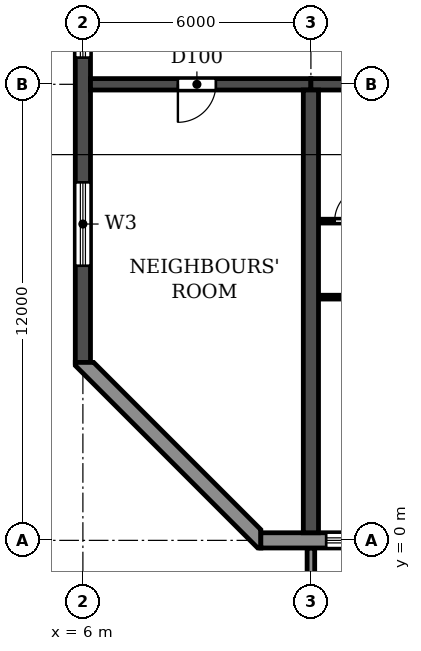
"""IFC4 building model, lengths in metres.
Left out: names, types, materials, properties, quantities, classifications, styles, units other than length and angle.
Written with IfcOpenShell. Run it as: python <this file> out.ifc"""

import sys

from ifc_helpers import new_model, si_unit, direction, frame, frame_2d, origin, place, context, subcontext, project, spatial, polyline, rectangle, outline, extrude, source, transform, mapped, element, fill, save


model = new_model("IFC4")
c1 = context("Model", 3, precision=1e-05, world=origin(), true_north=direction((0.0, 1.0)))
c2 = subcontext(c1, "Body", "Model", "MODEL_VIEW")
j1 = project(units=[si_unit("LENGTHUNIT", "METRE"), si_unit("PLANEANGLEUNIT", "RADIAN")], contexts=[c1])
p1 = place(None, origin())
s1 = spatial("IfcSite", under=j1, at=p1, CompositionType="ELEMENT")
p2 = place(p1, origin())
s2 = spatial("IfcBuilding", under=s1, at=p2, CompositionType="ELEMENT")
p3 = place(p2, frame((0.0, 0.0, 63.0)))
s3 = spatial("IfcBuildingStorey", under=s2, at=p3, CompositionType="ELEMENT", Elevation=63.0)
p4 = place(p3, frame((12.0, 0.2, 0.0), z_axis=(0.0, 0.0, 1.0), x_axis=(0.0, 1.0, 0.0)))
e1 = element("IfcWall", 1, at=p4, inside=s3, PredefinedType="SHEAR", context=c2, shape_type="SweptSolid", body=[
    extrude(rectangle(XDim=11.65, YDim=0.4, at=frame_2d((5.825, 0.0))), origin(), (0.0, 0.0, 1.0), 2.95),
])
p5 = place(p3, frame((6.0, 4.683, 0.0), z_axis=(0.0, 0.0, 1.0), x_axis=(0.0, 1.0, 0.0)))
e2 = element("IfcWall", 2, at=p5, inside=s3, PredefinedType="SHEAR", context=c2, shape_type="SweptSolid", body=[
    extrude(rectangle(XDim=35.434, YDim=0.4, at=frame_2d((17.717, 0.0))), origin(), (0.0, 0.0, 1.0), 2.95),
])
p6 = place(p5, frame((23.817, 0.0, 0.9)))
e3 = element("IfcOpeningElement", 3, at=p6, cuts=e2, PredefinedType="OPENING", context=c2, shape_type="SweptSolid", body=[
    extrude(rectangle(XDim=1.2, YDim=1.5, at=frame_2d((0.6, 0.75))), frame((0.0, 0.21, 0.0), z_axis=(0.0, -1.0, 0.0), x_axis=(1.0, 0.0, 0.0)), (0.0, 0.0, 1.0), 0.42),
])
p7 = place(p5, frame((8.017, 0.0, 0.9)))
e4 = element("IfcOpeningElement", 4, at=p7, cuts=e2, PredefinedType="OPENING", context=c2, shape_type="SweptSolid", body=[
    extrude(rectangle(XDim=1.2, YDim=1.5, at=frame_2d((0.6, 0.75))), frame((0.0, 0.21, 0.0), z_axis=(0.0, -1.0, 0.0), x_axis=(1.0, 0.0, 0.0)), (0.0, 0.0, 1.0), 0.42),
])
p8 = place(p5, frame((15.917, 0.0, 0.9)))
e5 = element("IfcOpeningElement", 5, at=p8, cuts=e2, PredefinedType="OPENING", context=c2, shape_type="SweptSolid", body=[
    extrude(rectangle(XDim=1.2, YDim=1.5, at=frame_2d((0.6, 0.75))), frame((0.0, 0.21, 0.0), z_axis=(0.0, -1.0, 0.0), x_axis=(1.0, 0.0, 0.0)), (0.0, 0.0, 1.0), 0.42),
])
p9 = place(p5, frame((29.493, 0.0, 0.6)))
e6 = element("IfcOpeningElement", 6, at=p9, cuts=e2, PredefinedType="OPENING", context=c2, shape_type="SweptSolid", body=[
    extrude(rectangle(XDim=2.2, YDim=1.8, at=frame_2d((1.1, 0.9))), frame((0.0, 0.21, 0.0), z_axis=(0.0, -1.0, 0.0), x_axis=(1.0, 0.0, 0.0)), (0.0, 0.0, 1.0), 0.42),
])
p10 = place(p5, frame((2.541, 0.0, 0.6)))
e7 = element("IfcOpeningElement", 7, at=p10, cuts=e2, PredefinedType="OPENING", context=c2, shape_type="SweptSolid", body=[
    extrude(rectangle(XDim=2.2, YDim=1.8, at=frame_2d((1.1, 0.9))), frame((0.0, 0.21, 0.0), z_axis=(0.0, -1.0, 0.0), x_axis=(1.0, 0.0, 0.0)), (0.0, 0.0, 1.0), 0.42),
])
p11 = place(p3, frame((6.2, 12.0, 0.0), z_axis=(0.0, 0.0, 1.0), x_axis=(1.0, 0.0, 0.0)))
e8 = element("IfcWall", 8, at=p11, inside=s3, PredefinedType="SHEAR", context=c2, shape_type="SweptSolid", body=[
    extrude(rectangle(XDim=5.8, YDim=0.3, at=frame_2d((2.9, 0.0))), origin(), (0.0, 0.0, 1.0), 2.35),
])
p12 = place(p11, frame((2.3, 0.0, 0.0)))
e9 = element("IfcOpeningElement", 9, at=p12, cuts=e8, PredefinedType="OPENING", context=c2, shape_type="SweptSolid", body=[
    extrude(rectangle(XDim=1.0, YDim=2.1, at=frame_2d((0.5, 1.05))), frame((0.0, 0.16, 0.0), z_axis=(0.0, -1.0, 0.0), x_axis=(1.0, 0.0, 0.0)), (0.0, 0.0, 1.0), 0.32),
])
p13 = place(p3, frame((12.0, 12.0, 0.0), z_axis=(0.0, 0.0, 1.0), x_axis=(1.0, 0.0, 0.0)))
e10 = element("IfcWall", 10, at=p13, inside=s3, PredefinedType="SHEAR", context=c2, shape_type="SweptSolid", body=[
    extrude(rectangle(XDim=6.0, YDim=0.3, at=frame_2d((3.0, 0.0))), origin(), (0.0, 0.0, 1.0), 2.35),
])
p14 = place(p13, frame((2.55, 0.0, 0.0)))
e11 = element("IfcOpeningElement", 11, at=p14, cuts=e10, PredefinedType="OPENING", context=c2, shape_type="SweptSolid", body=[
    extrude(rectangle(XDim=1.0, YDim=2.1, at=frame_2d((0.5, 1.05))), frame((0.0, 0.16, 0.0), z_axis=(0.0, -1.0, 0.0), x_axis=(1.0, 0.0, 0.0)), (0.0, 0.0, 1.0), 0.32),
])
p15 = place(p3, frame((10.683, 0.0, 0.0), z_axis=(0.0, 0.0, 1.0), x_axis=(1.0, 0.0, 0.0)))
e12 = element("IfcWall", 12, at=p15, inside=s3, PredefinedType="STANDARD", context=c2, shape_type="SweptSolid", body=[
    extrude(rectangle(XDim=80.634, YDim=0.4, at=frame_2d((40.317, 0.0))), origin(), (0.0, 0.0, 1.0), 2.95),
])
p16 = place(p15, frame((1.717, 0.0, 0.9)))
e13 = element("IfcOpeningElement", 13, at=p16, cuts=e12, PredefinedType="OPENING", context=c2, shape_type="SweptSolid", body=[
    extrude(rectangle(XDim=2.2, YDim=1.5, at=frame_2d((1.1, 0.75))), frame((0.0, 0.21, 0.0), z_axis=(0.0, -1.0, 0.0), x_axis=(1.0, 0.0, 0.0)), (0.0, 0.0, 1.0), 0.42),
])
p17 = place(p15, frame((4.917, 0.0, 0.0)))
e14 = element("IfcOpeningElement", 14, at=p17, cuts=e12, PredefinedType="OPENING", context=c2, shape_type="SweptSolid", body=[
    extrude(rectangle(XDim=1.8, YDim=2.4, at=frame_2d((0.9, 1.2))), frame((0.0, 0.21, 0.0), z_axis=(0.0, -1.0, 0.0), x_axis=(1.0, 0.0, 0.0)), (0.0, 0.0, 1.0), 0.42),
])
p18 = place(p15, frame((7.717, 0.0, 0.9)))
e15 = element("IfcOpeningElement", 15, at=p18, cuts=e12, PredefinedType="OPENING", context=c2, shape_type="SweptSolid", body=[
    extrude(rectangle(XDim=2.2, YDim=1.5, at=frame_2d((1.1, 0.75))), frame((0.0, 0.21, 0.0), z_axis=(0.0, -1.0, 0.0), x_axis=(1.0, 0.0, 0.0)), (0.0, 0.0, 1.0), 0.42),
])
p19 = place(p15, frame((10.717, 0.0, 0.9)))
e16 = element("IfcOpeningElement", 16, at=p19, cuts=e12, PredefinedType="OPENING", context=c2, shape_type="SweptSolid", body=[
    extrude(rectangle(XDim=2.2, YDim=1.5, at=frame_2d((1.1, 0.75))), frame((0.0, 0.21, 0.0), z_axis=(0.0, -1.0, 0.0), x_axis=(1.0, 0.0, 0.0)), (0.0, 0.0, 1.0), 0.42),
])
p20 = place(p15, frame((13.717, 0.0, 0.9)))
e17 = element("IfcOpeningElement", 17, at=p20, cuts=e12, PredefinedType="OPENING", context=c2, shape_type="SweptSolid", body=[
    extrude(rectangle(XDim=2.2, YDim=1.5, at=frame_2d((1.1, 0.75))), frame((0.0, 0.21, 0.0), z_axis=(0.0, -1.0, 0.0), x_axis=(1.0, 0.0, 0.0)), (0.0, 0.0, 1.0), 0.42),
])
p21 = place(p15, frame((16.917, 0.0, 0.0)))
e18 = element("IfcOpeningElement", 18, at=p21, cuts=e12, PredefinedType="OPENING", context=c2, shape_type="SweptSolid", body=[
    extrude(rectangle(XDim=1.8, YDim=2.4, at=frame_2d((0.9, 1.2))), frame((0.0, 0.21, 0.0), z_axis=(0.0, -1.0, 0.0), x_axis=(1.0, 0.0, 0.0)), (0.0, 0.0, 1.0), 0.42),
])
p22 = place(p15, frame((19.717, 0.0, 0.9)))
e19 = element("IfcOpeningElement", 19, at=p22, cuts=e12, PredefinedType="OPENING", context=c2, shape_type="SweptSolid", body=[
    extrude(rectangle(XDim=2.2, YDim=1.5, at=frame_2d((1.1, 0.75))), frame((0.0, 0.21, 0.0), z_axis=(0.0, -1.0, 0.0), x_axis=(1.0, 0.0, 0.0)), (0.0, 0.0, 1.0), 0.42),
])
p23 = place(p15, frame((22.717, 0.0, 0.9)))
e20 = element("IfcOpeningElement", 20, at=p23, cuts=e12, PredefinedType="OPENING", context=c2, shape_type="SweptSolid", body=[
    extrude(rectangle(XDim=2.2, YDim=1.5, at=frame_2d((1.1, 0.75))), frame((0.0, 0.21, 0.0), z_axis=(0.0, -1.0, 0.0), x_axis=(1.0, 0.0, 0.0)), (0.0, 0.0, 1.0), 0.42),
])
p24 = place(p15, frame((25.917, 0.0, 0.0)))
e21 = element("IfcOpeningElement", 21, at=p24, cuts=e12, PredefinedType="OPENING", context=c2, shape_type="SweptSolid", body=[
    extrude(rectangle(XDim=1.8, YDim=2.4, at=frame_2d((0.9, 1.2))), frame((0.0, 0.21, 0.0), z_axis=(0.0, -1.0, 0.0), x_axis=(1.0, 0.0, 0.0)), (0.0, 0.0, 1.0), 0.42),
])
p25 = place(p15, frame((28.717, 0.0, 0.9)))
e22 = element("IfcOpeningElement", 22, at=p25, cuts=e12, PredefinedType="OPENING", context=c2, shape_type="SweptSolid", body=[
    extrude(rectangle(XDim=2.2, YDim=1.5, at=frame_2d((1.1, 0.75))), frame((0.0, 0.21, 0.0), z_axis=(0.0, -1.0, 0.0), x_axis=(1.0, 0.0, 0.0)), (0.0, 0.0, 1.0), 0.42),
])
p26 = place(p15, frame((31.717, 0.0, 0.9)))
e23 = element("IfcOpeningElement", 23, at=p26, cuts=e12, PredefinedType="OPENING", context=c2, shape_type="SweptSolid", body=[
    extrude(rectangle(XDim=2.2, YDim=1.5, at=frame_2d((1.1, 0.75))), frame((0.0, 0.21, 0.0), z_axis=(0.0, -1.0, 0.0), x_axis=(1.0, 0.0, 0.0)), (0.0, 0.0, 1.0), 0.42),
])
p27 = place(p15, frame((34.717, 0.0, 0.9)))
e24 = element("IfcOpeningElement", 24, at=p27, cuts=e12, PredefinedType="OPENING", context=c2, shape_type="SweptSolid", body=[
    extrude(rectangle(XDim=2.2, YDim=1.5, at=frame_2d((1.1, 0.75))), frame((0.0, 0.21, 0.0), z_axis=(0.0, -1.0, 0.0), x_axis=(1.0, 0.0, 0.0)), (0.0, 0.0, 1.0), 0.42),
])
p28 = place(p15, frame((37.717, 0.0, 0.9)))
e25 = element("IfcOpeningElement", 25, at=p28, cuts=e12, PredefinedType="OPENING", context=c2, shape_type="SweptSolid", body=[
    extrude(rectangle(XDim=2.2, YDim=1.5, at=frame_2d((1.1, 0.75))), frame((0.0, 0.21, 0.0), z_axis=(0.0, -1.0, 0.0), x_axis=(1.0, 0.0, 0.0)), (0.0, 0.0, 1.0), 0.42),
])
p29 = place(p15, frame((40.917, 0.0, 0.0)))
e26 = element("IfcOpeningElement", 26, at=p29, cuts=e12, PredefinedType="OPENING", context=c2, shape_type="SweptSolid", body=[
    extrude(rectangle(XDim=1.8, YDim=2.4, at=frame_2d((0.9, 1.2))), frame((0.0, 0.21, 0.0), z_axis=(0.0, -1.0, 0.0), x_axis=(1.0, 0.0, 0.0)), (0.0, 0.0, 1.0), 0.42),
])
p30 = place(p15, frame((43.717, 0.0, 0.9)))
e27 = element("IfcOpeningElement", 27, at=p30, cuts=e12, PredefinedType="OPENING", context=c2, shape_type="SweptSolid", body=[
    extrude(rectangle(XDim=2.2, YDim=1.5, at=frame_2d((1.1, 0.75))), frame((0.0, 0.21, 0.0), z_axis=(0.0, -1.0, 0.0), x_axis=(1.0, 0.0, 0.0)), (0.0, 0.0, 1.0), 0.42),
])
p31 = place(p15, frame((46.717, 0.0, 0.9)))
e28 = element("IfcOpeningElement", 28, at=p31, cuts=e12, PredefinedType="OPENING", context=c2, shape_type="SweptSolid", body=[
    extrude(rectangle(XDim=2.2, YDim=1.5, at=frame_2d((1.1, 0.75))), frame((0.0, 0.21, 0.0), z_axis=(0.0, -1.0, 0.0), x_axis=(1.0, 0.0, 0.0)), (0.0, 0.0, 1.0), 0.42),
])
p32 = place(p15, frame((49.717, 0.0, 0.9)))
e29 = element("IfcOpeningElement", 29, at=p32, cuts=e12, PredefinedType="OPENING", context=c2, shape_type="SweptSolid", body=[
    extrude(rectangle(XDim=2.2, YDim=1.5, at=frame_2d((1.1, 0.75))), frame((0.0, 0.21, 0.0), z_axis=(0.0, -1.0, 0.0), x_axis=(1.0, 0.0, 0.0)), (0.0, 0.0, 1.0), 0.42),
])
p33 = place(p15, frame((52.717, 0.0, 0.9)))
e30 = element("IfcOpeningElement", 30, at=p33, cuts=e12, PredefinedType="OPENING", context=c2, shape_type="SweptSolid", body=[
    extrude(rectangle(XDim=2.2, YDim=1.5, at=frame_2d((1.1, 0.75))), frame((0.0, 0.21, 0.0), z_axis=(0.0, -1.0, 0.0), x_axis=(1.0, 0.0, 0.0)), (0.0, 0.0, 1.0), 0.42),
])
p34 = place(p15, frame((55.717, 0.0, 0.9)))
e31 = element("IfcOpeningElement", 31, at=p34, cuts=e12, PredefinedType="OPENING", context=c2, shape_type="SweptSolid", body=[
    extrude(rectangle(XDim=2.2, YDim=1.5, at=frame_2d((1.1, 0.75))), frame((0.0, 0.21, 0.0), z_axis=(0.0, -1.0, 0.0), x_axis=(1.0, 0.0, 0.0)), (0.0, 0.0, 1.0), 0.42),
])
p35 = place(p15, frame((58.717, 0.0, 0.9)))
e32 = element("IfcOpeningElement", 32, at=p35, cuts=e12, PredefinedType="OPENING", context=c2, shape_type="SweptSolid", body=[
    extrude(rectangle(XDim=2.2, YDim=1.5, at=frame_2d((1.1, 0.75))), frame((0.0, 0.21, 0.0), z_axis=(0.0, -1.0, 0.0), x_axis=(1.0, 0.0, 0.0)), (0.0, 0.0, 1.0), 0.42),
])
p36 = place(p15, frame((61.717, 0.0, 0.9)))
e33 = element("IfcOpeningElement", 33, at=p36, cuts=e12, PredefinedType="OPENING", context=c2, shape_type="SweptSolid", body=[
    extrude(rectangle(XDim=2.2, YDim=1.5, at=frame_2d((1.1, 0.75))), frame((0.0, 0.21, 0.0), z_axis=(0.0, -1.0, 0.0), x_axis=(1.0, 0.0, 0.0)), (0.0, 0.0, 1.0), 0.42),
])
p37 = place(p15, frame((64.917, 0.0, 0.0)))
e34 = element("IfcOpeningElement", 34, at=p37, cuts=e12, PredefinedType="OPENING", context=c2, shape_type="SweptSolid", body=[
    extrude(rectangle(XDim=1.8, YDim=2.4, at=frame_2d((0.9, 1.2))), frame((0.0, 0.21, 0.0), z_axis=(0.0, -1.0, 0.0), x_axis=(1.0, 0.0, 0.0)), (0.0, 0.0, 1.0), 0.42),
])
p38 = place(p15, frame((67.717, 0.0, 0.9)))
e35 = element("IfcOpeningElement", 35, at=p38, cuts=e12, PredefinedType="OPENING", context=c2, shape_type="SweptSolid", body=[
    extrude(rectangle(XDim=2.2, YDim=1.5, at=frame_2d((1.1, 0.75))), frame((0.0, 0.21, 0.0), z_axis=(0.0, -1.0, 0.0), x_axis=(1.0, 0.0, 0.0)), (0.0, 0.0, 1.0), 0.42),
])
p39 = place(p15, frame((70.717, 0.0, 0.9)))
e36 = element("IfcOpeningElement", 36, at=p39, cuts=e12, PredefinedType="OPENING", context=c2, shape_type="SweptSolid", body=[
    extrude(rectangle(XDim=2.2, YDim=1.5, at=frame_2d((1.1, 0.75))), frame((0.0, 0.21, 0.0), z_axis=(0.0, -1.0, 0.0), x_axis=(1.0, 0.0, 0.0)), (0.0, 0.0, 1.0), 0.42),
])
p40 = place(p15, frame((73.717, 0.0, 0.9)))
e37 = element("IfcOpeningElement", 37, at=p40, cuts=e12, PredefinedType="OPENING", context=c2, shape_type="SweptSolid", body=[
    extrude(rectangle(XDim=2.2, YDim=1.5, at=frame_2d((1.1, 0.75))), frame((0.0, 0.21, 0.0), z_axis=(0.0, -1.0, 0.0), x_axis=(1.0, 0.0, 0.0)), (0.0, 0.0, 1.0), 0.42),
])
p41 = place(p15, frame((76.917, 0.0, 0.0)))
e38 = element("IfcOpeningElement", 38, at=p41, cuts=e12, PredefinedType="OPENING", context=c2, shape_type="SweptSolid", body=[
    extrude(rectangle(XDim=1.8, YDim=2.4, at=frame_2d((0.9, 1.2))), frame((0.0, 0.21, 0.0), z_axis=(0.0, -1.0, 0.0), x_axis=(1.0, 0.0, 0.0)), (0.0, 0.0, 1.0), 0.42),
])
p42 = place(p3, origin())
e39 = element("IfcWall", 39, at=p42, inside=s3, PredefinedType="STANDARD", context=c2, shape_type="SweptSolid", body=[
    extrude(outline(polyline([(5.8, 4.683), (5.8, 4.6), (10.6, -0.2), (10.683, -0.2), (10.683, 0.283), (6.283, 4.683), (5.8, 4.683)])), origin(), (0.0, 0.0, 1.0), 2.95),
])
m1 = source(origin(), c2, "Body", "SweptSolid", [
    extrude(outline(polyline([(0.0, 0.0), (0.2, 0.0), (0.2, 1.65), (0.0, 1.65), (0.0, 0.0)])), origin(), (0.0, 0.0, 1.0), 3.1),
])
p43 = place(p3, frame((11.9, -1.85, 0.0)))
e40 = element("IfcWall", 40, at=p43, inside=s3, PredefinedType="STANDARD", context=c2, shape_type="MappedRepresentation", body=[
    mapped(m1, transform((0.0, 0.0, 0.0))),
])
p44 = place(p3, frame((12.21, 6.4, 0.0), z_axis=(0.0, 0.0, 1.0), x_axis=(1.0, 0.0, 0.0)))
e41 = element("IfcWall", 41, at=p44, inside=s3, PredefinedType="PARTITIONING", context=c2, shape_type="SweptSolid", body=[
    extrude(rectangle(XDim=2.84, YDim=0.1, at=frame_2d((1.42, 0.0))), origin(), (0.0, 0.0, 1.0), 2.95),
])
p45 = place(p44, frame((1.39, 0.0, 0.0)))
e42 = element("IfcOpeningElement", 42, at=p45, cuts=e41, PredefinedType="OPENING", context=c2, shape_type="SweptSolid", body=[
    extrude(rectangle(XDim=0.9, YDim=2.1, at=frame_2d((0.45, 1.05))), frame((0.0, 0.06, 0.0), z_axis=(0.0, -1.0, 0.0), x_axis=(1.0, 0.0, 0.0)), (0.0, 0.0, 1.0), 0.12),
])
p46 = place(p3, frame((12.21, 8.4, 0.0), z_axis=(0.0, 0.0, 1.0), x_axis=(1.0, 0.0, 0.0)))
e43 = element("IfcWall", 43, at=p46, inside=s3, PredefinedType="PARTITIONING", context=c2, shape_type="SweptSolid", body=[
    extrude(rectangle(XDim=1.99, YDim=0.1, at=frame_2d((0.995, 0.0))), origin(), (0.0, 0.0, 1.0), 2.95),
])
p47 = place(p46, frame((0.415, 0.0, 0.0)))
e44 = element("IfcOpeningElement", 44, at=p47, cuts=e43, PredefinedType="OPENING", context=c2, shape_type="SweptSolid", body=[
    extrude(rectangle(XDim=0.9, YDim=2.1, at=frame_2d((0.45, 1.05))), frame((0.0, 0.06, 0.0), z_axis=(0.0, -1.0, 0.0), x_axis=(1.0, 0.0, 0.0)), (0.0, 0.0, 1.0), 0.12),
])
p48 = place(p16, origin())
e45 = element("IfcWindow", 45, at=p48, inside=s3, PartitioningType="DOUBLE_PANEL_HORIZONTAL", PredefinedType="WINDOW", context=c2, shape_type="SweptSolid", body=[
    extrude(rectangle(XDim=2.2, YDim=1.5, at=frame_2d((1.1, 0.75))), frame((0.0, 0.03, 0.0), z_axis=(0.0, -1.0, 0.0), x_axis=(1.0, 0.0, 0.0)), (0.0, 0.0, 1.0), 0.06),
])
fill(e13, e45)
p49 = place(p7, origin())
e46 = element("IfcWindow", 46, at=p49, inside=s3, PartitioningType="SINGLE_PANEL", PredefinedType="WINDOW", context=c2, shape_type="SweptSolid", body=[
    extrude(rectangle(XDim=1.2, YDim=1.5, at=frame_2d((0.6, 0.75))), frame((0.0, 0.03, 0.0), z_axis=(0.0, -1.0, 0.0), x_axis=(1.0, 0.0, 0.0)), (0.0, 0.0, 1.0), 0.06),
])
fill(e4, e46)
p50 = place(p10, origin())
e47 = element("IfcWindow", 47, at=p50, inside=s3, PartitioningType="DOUBLE_PANEL_HORIZONTAL", PredefinedType="WINDOW", context=c2, shape_type="SweptSolid", body=[
    extrude(rectangle(XDim=2.2, YDim=1.8, at=frame_2d((1.1, 0.9))), frame((0.0, 0.03, 0.0), z_axis=(0.0, -1.0, 0.0), x_axis=(1.0, 0.0, 0.0)), (0.0, 0.0, 1.0), 0.06),
])
fill(e7, e47)
p51 = place(p12, frame((1.0, 0.0, 0.0), z_axis=(0.0, 0.0, 1.0), x_axis=(-1.0, 0.0, 0.0)))
e48 = element("IfcDoor", 48, at=p51, inside=s3, OperationType="SINGLE_SWING_RIGHT", PredefinedType="DOOR", context=c2, shape_type="SweptSolid", body=[
    extrude(rectangle(XDim=1.0, YDim=2.1, at=frame_2d((0.5, 1.05))), frame((0.0, 0.025, 0.0), z_axis=(0.0, -1.0, 0.0), x_axis=(1.0, 0.0, 0.0)), (0.0, 0.0, 1.0), 0.05),
])
fill(e9, e48)
p52 = place(p47, origin())
e49 = element("IfcDoor", 49, at=p52, inside=s3, OperationType="SINGLE_SWING_RIGHT", PredefinedType="DOOR", context=c2, shape_type="SweptSolid", body=[
    extrude(rectangle(XDim=0.9, YDim=2.1, at=frame_2d((0.45, 1.05))), frame((0.0, 0.025, 0.0), z_axis=(0.0, -1.0, 0.0), x_axis=(1.0, 0.0, 0.0)), (0.0, 0.0, 1.0), 0.05),
])
fill(e44, e49)
save(model, sys.argv[1])
